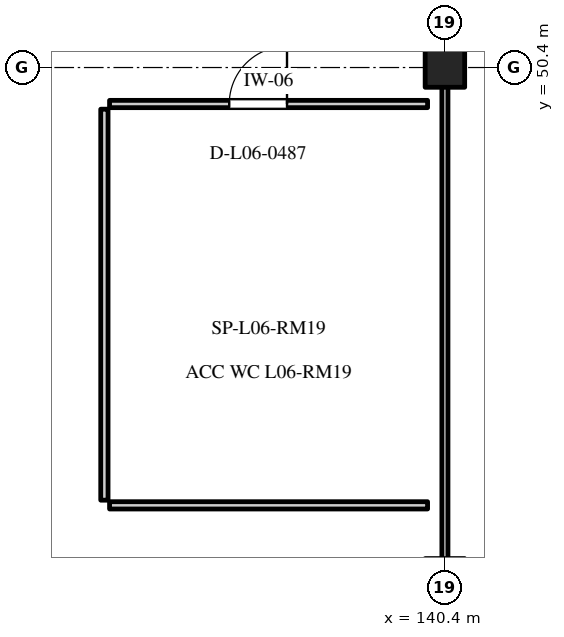
"""IFC4 building model, lengths in metres.
Left out: names, types, materials, properties, quantities, classifications, styles, units other than length and angle.
Written with IfcOpenShell. Run it as: python <this file> out.ifc"""

import sys

from ifc_helpers import new_model, si_unit, direction, frame, frame_2d, origin, origin_2d, place, context, subcontext, project, spatial, rectangle, extrude, element, fill, save


model = new_model("IFC4")
c1 = context("Model", 3, precision=1e-05, world=origin(), true_north=direction((0.0, 1.0)))
c2 = subcontext(c1, "Body", "Model", "MODEL_VIEW")
j1 = project(units=[si_unit("LENGTHUNIT", "METRE"), si_unit("PLANEANGLEUNIT", "RADIAN")], contexts=[c1])
p1 = place(None, origin())
s1 = spatial("IfcSite", under=j1, at=p1, CompositionType="ELEMENT")
p2 = place(p1, origin())
s2 = spatial("IfcBuilding", under=s1, at=p2, CompositionType="ELEMENT")
p3 = place(p2, frame((0.0, 0.0, 26.1)))
s3 = spatial("IfcBuildingStorey", under=s2, at=p3, CompositionType="ELEMENT", Elevation=26.1)
p4 = place(p3, frame((140.4, 50.4, 0.0), z_axis=(0.0, 0.0, 1.0), x_axis=(1.0, 0.0, 0.0)))
e1 = element("IfcColumn", 1, at=p4, inside=s3, PredefinedType="COLUMN", context=c2, shape_type="SweptSolid", body=[
    extrude(rectangle(XDim=0.65, YDim=0.65, at=origin_2d()), origin(), (0.0, 0.0, 1.0), 3.6),
])
p5 = place(p3, frame((140.4, 33.685, 0.0), z_axis=(0.0, 0.0, 1.0), x_axis=(0.0, 1.0, 0.0)))
e2 = element("IfcWall", 2, at=p5, inside=s3, PredefinedType="PARTITIONING", context=c2, shape_type="SweptSolid", body=[
    extrude(rectangle(XDim=33.03, YDim=0.1, at=frame_2d((16.515, 0.0))), origin(), (0.0, 0.0, 1.0), 3.28),
])
p6 = place(p5, frame((2.693, 0.0, 0.0)))
e3 = element("IfcOpeningElement", 3, at=p6, cuts=e2, PredefinedType="OPENING", context=c2, shape_type="SweptSolid", body=[
    extrude(rectangle(XDim=1.12, YDim=2.2, at=frame_2d((0.56, 1.1))), frame((0.0, 0.062, 0.0), z_axis=(0.0, -1.0, 0.0), x_axis=(1.0, 0.0, 0.0)), (0.0, 0.0, 1.0), 0.124),
])
p7 = place(p3, frame((134.885, 49.8, 0.0), z_axis=(0.0, 0.0, 1.0), x_axis=(1.0, 0.0, 0.0)))
e4 = element("IfcWall", 4, at=p7, inside=s3, PredefinedType="PARTITIONING", context=c2, shape_type="SweptSolid", body=[
    extrude(rectangle(XDim=5.23, YDim=0.12, at=frame_2d((2.615, 0.0))), origin(), (0.0, 0.0, 1.0), 3.28),
])
p8 = place(p7, frame((1.968, 0.0, 0.0)))
e5 = element("IfcOpeningElement", 5, at=p8, cuts=e4, PredefinedType="OPENING", context=c2, shape_type="SweptSolid", body=[
    extrude(rectangle(XDim=0.95, YDim=2.1, at=frame_2d((0.475, 1.05))), frame((0.0, 0.072, 0.0), z_axis=(0.0, -1.0, 0.0), x_axis=(1.0, 0.0, 0.0)), (0.0, 0.0, 1.0), 0.144),
])
p9 = place(p3, frame((134.885, 43.2, 0.0), z_axis=(0.0, 0.0, 1.0), x_axis=(1.0, 0.0, 0.0)))
e6 = element("IfcWall", 6, at=p9, inside=s3, PredefinedType="PARTITIONING", context=c2, shape_type="SweptSolid", body=[
    extrude(rectangle(XDim=5.23, YDim=0.12, at=frame_2d((2.615, 0.0))), origin(), (0.0, 0.0, 1.0), 3.28),
])
p10 = place(p3, frame((134.8, 43.285, 0.0), z_axis=(0.0, 0.0, 1.0), x_axis=(0.0, 1.0, 0.0)))
e7 = element("IfcWall", 7, at=p10, inside=s3, PredefinedType="PARTITIONING", context=c2, shape_type="SweptSolid", body=[
    extrude(rectangle(XDim=6.43, YDim=0.12, at=frame_2d((3.215, 0.0))), origin(), (0.0, 0.0, 1.0), 3.28),
])
p11 = place(p8, frame((0.95, 0.0, 0.0), z_axis=(0.0, 0.0, 1.0), x_axis=(-1.0, 0.0, 0.0)))
e8 = element("IfcDoor", 8, at=p11, inside=s3, OperationType="SINGLE_SWING_LEFT", PredefinedType="DOOR", context=c2, shape_type="SweptSolid", body=[
    extrude(rectangle(XDim=0.95, YDim=2.1, at=frame_2d((0.475, 1.05))), frame((0.0, 0.025, 0.0), z_axis=(0.0, -1.0, 0.0), x_axis=(1.0, 0.0, 0.0)), (0.0, 0.0, 1.0), 0.05),
])
fill(e5, e8)
save(model, sys.argv[1])
